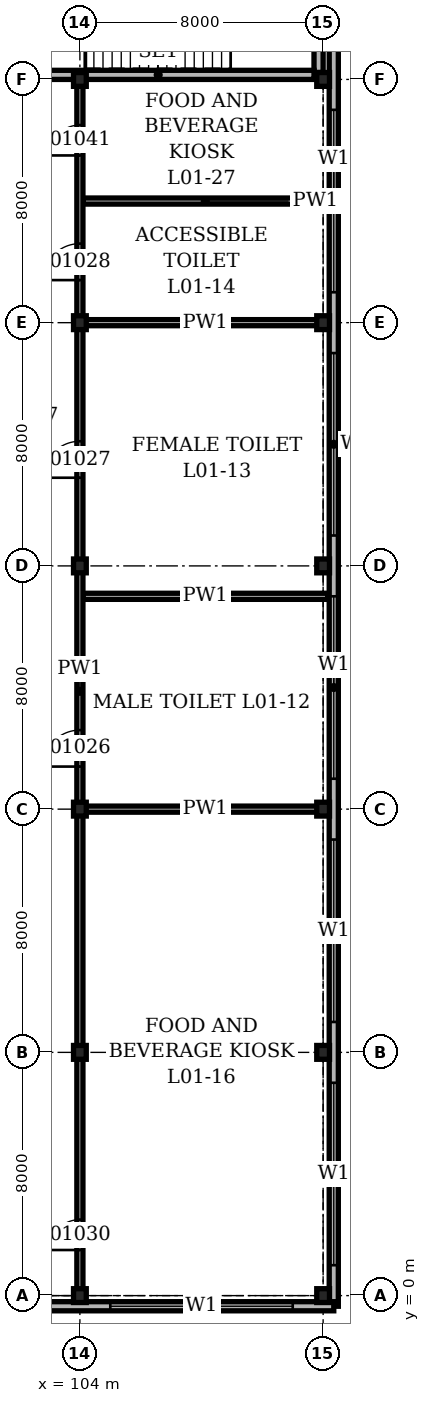
"""IFC4 building model, lengths in metres.
Left out: names, types, materials, properties, quantities, classifications, styles, units other than length and angle.
Written with IfcOpenShell. Run it as: python <this file> out.ifc"""

import sys

from ifc_helpers import new_model, si_unit, direction, frame, frame_2d, origin, origin_2d, place, context, subcontext, project, spatial, rectangle, i_section, extrude, element, fill, save


model = new_model("IFC4")
c1 = context("Model", 3, precision=1e-05, world=origin(), true_north=direction((0.0, 1.0)))
c2 = subcontext(c1, "Body", "Model", "MODEL_VIEW")
j1 = project(units=[si_unit("LENGTHUNIT", "METRE"), si_unit("PLANEANGLEUNIT", "RADIAN")], contexts=[c1])
p1 = place(None, origin())
s1 = spatial("IfcSite", under=j1, at=p1, CompositionType="ELEMENT")
p2 = place(p1, origin())
s2 = spatial("IfcBuilding", under=s1, at=p2, CompositionType="ELEMENT")
p3 = place(p2, frame((0.0, 0.0, 4.9)))
s3 = spatial("IfcBuildingStorey", under=s2, at=p3, CompositionType="ELEMENT", Elevation=4.9)
for number, where, z_axis, x_axis in (
    (1, (104.0, 0.0, 0.0), (0.0, 0.0, 1.0), (1.0, 0.0, 0.0)),
    (2, (104.0, 8.0, 0.0), (0.0, 0.0, 1.0), (1.0, 0.0, 0.0)),
    (3, (104.0, 16.0, 0.0), (0.0, 0.0, 1.0), (1.0, 0.0, 0.0)),
    (4, (104.0, 24.0, 0.0), (0.0, 0.0, 1.0), (1.0, 0.0, 0.0)),
    (5, (104.0, 32.0, 0.0), (0.0, 0.0, 1.0), (1.0, 0.0, 0.0)),
    (6, (104.0, 40.0, 0.0), (0.0, 0.0, 1.0), (1.0, 0.0, 0.0)),
    (7, (112.0, 0.0, 0.0), (0.0, 0.0, 1.0), (1.0, 0.0, 0.0)),
    (8, (112.0, 8.0, 0.0), (0.0, 0.0, 1.0), (1.0, 0.0, 0.0)),
    (9, (112.0, 16.0, 0.0), (0.0, 0.0, 1.0), (1.0, 0.0, 0.0)),
    (10, (112.0, 24.0, 0.0), (0.0, 0.0, 1.0), (1.0, 0.0, 0.0)),
    (11, (112.0, 32.0, 0.0), (0.0, 0.0, 1.0), (1.0, 0.0, 0.0)),
    (12, (112.0, 40.0, 0.0), (0.0, 0.0, 1.0), (1.0, 0.0, 0.0)),
):
    element("IfcColumn", number, at=place(p3, frame(where, z_axis=z_axis, x_axis=x_axis)), inside=s3, PredefinedType="COLUMN", context=c2, shape_type="SweptSolid", body=[
        extrude(i_section(OverallWidth=0.419, OverallDepth=0.455, WebThickness=0.042, FlangeThickness=0.068, at=origin_2d()), origin(), (0.0, 0.0, 1.0), 5.0),
    ])
p4 = place(p3, frame((-0.35, -0.35, 0.0), z_axis=(0.0, 0.0, 1.0), x_axis=(1.0, 0.0, 0.0)))
e13 = element("IfcWall", 13, at=p4, inside=s3, PredefinedType="SOLIDWALL", context=c2, shape_type="SweptSolid", body=[
    extrude(rectangle(XDim=112.7, YDim=0.3, at=frame_2d((56.35, 0.0))), origin(), (0.0, 0.0, 1.0), 5.0),
])
p5 = place(p4, frame((1.35, 0.0, 1.0)))
e14 = element("IfcOpeningElement", 14, at=p5, cuts=e13, PredefinedType="OPENING", context=c2, shape_type="SweptSolid", body=[
    extrude(rectangle(XDim=6.0, YDim=1.5, at=frame_2d((3.0, 0.75))), frame((0.0, 0.16, 0.0), z_axis=(0.0, -1.0, 0.0), x_axis=(1.0, 0.0, 0.0)), (0.0, 0.0, 1.0), 0.32),
])
p6 = place(p4, frame((9.35, 0.0, 1.0)))
e15 = element("IfcOpeningElement", 15, at=p6, cuts=e13, PredefinedType="OPENING", context=c2, shape_type="SweptSolid", body=[
    extrude(rectangle(XDim=6.0, YDim=1.5, at=frame_2d((3.0, 0.75))), frame((0.0, 0.16, 0.0), z_axis=(0.0, -1.0, 0.0), x_axis=(1.0, 0.0, 0.0)), (0.0, 0.0, 1.0), 0.32),
])
p7 = place(p4, frame((17.35, 0.0, 1.0)))
e16 = element("IfcOpeningElement", 16, at=p7, cuts=e13, PredefinedType="OPENING", context=c2, shape_type="SweptSolid", body=[
    extrude(rectangle(XDim=6.0, YDim=1.5, at=frame_2d((3.0, 0.75))), frame((0.0, 0.16, 0.0), z_axis=(0.0, -1.0, 0.0), x_axis=(1.0, 0.0, 0.0)), (0.0, 0.0, 1.0), 0.32),
])
p8 = place(p4, frame((25.35, 0.0, 1.0)))
e17 = element("IfcOpeningElement", 17, at=p8, cuts=e13, PredefinedType="OPENING", context=c2, shape_type="SweptSolid", body=[
    extrude(rectangle(XDim=6.0, YDim=1.5, at=frame_2d((3.0, 0.75))), frame((0.0, 0.16, 0.0), z_axis=(0.0, -1.0, 0.0), x_axis=(1.0, 0.0, 0.0)), (0.0, 0.0, 1.0), 0.32),
])
p9 = place(p4, frame((33.35, 0.0, 1.0)))
e18 = element("IfcOpeningElement", 18, at=p9, cuts=e13, PredefinedType="OPENING", context=c2, shape_type="SweptSolid", body=[
    extrude(rectangle(XDim=6.0, YDim=1.5, at=frame_2d((3.0, 0.75))), frame((0.0, 0.16, 0.0), z_axis=(0.0, -1.0, 0.0), x_axis=(1.0, 0.0, 0.0)), (0.0, 0.0, 1.0), 0.32),
])
p10 = place(p4, frame((41.35, 0.0, 1.0)))
e19 = element("IfcOpeningElement", 19, at=p10, cuts=e13, PredefinedType="OPENING", context=c2, shape_type="SweptSolid", body=[
    extrude(rectangle(XDim=6.0, YDim=1.5, at=frame_2d((3.0, 0.75))), frame((0.0, 0.16, 0.0), z_axis=(0.0, -1.0, 0.0), x_axis=(1.0, 0.0, 0.0)), (0.0, 0.0, 1.0), 0.32),
])
p11 = place(p4, frame((49.35, 0.0, 1.0)))
e20 = element("IfcOpeningElement", 20, at=p11, cuts=e13, PredefinedType="OPENING", context=c2, shape_type="SweptSolid", body=[
    extrude(rectangle(XDim=6.0, YDim=1.5, at=frame_2d((3.0, 0.75))), frame((0.0, 0.16, 0.0), z_axis=(0.0, -1.0, 0.0), x_axis=(1.0, 0.0, 0.0)), (0.0, 0.0, 1.0), 0.32),
])
p12 = place(p4, frame((57.35, 0.0, 1.0)))
e21 = element("IfcOpeningElement", 21, at=p12, cuts=e13, PredefinedType="OPENING", context=c2, shape_type="SweptSolid", body=[
    extrude(rectangle(XDim=6.0, YDim=1.5, at=frame_2d((3.0, 0.75))), frame((0.0, 0.16, 0.0), z_axis=(0.0, -1.0, 0.0), x_axis=(1.0, 0.0, 0.0)), (0.0, 0.0, 1.0), 0.32),
])
p13 = place(p4, frame((65.35, 0.0, 1.0)))
e22 = element("IfcOpeningElement", 22, at=p13, cuts=e13, PredefinedType="OPENING", context=c2, shape_type="SweptSolid", body=[
    extrude(rectangle(XDim=6.0, YDim=1.5, at=frame_2d((3.0, 0.75))), frame((0.0, 0.16, 0.0), z_axis=(0.0, -1.0, 0.0), x_axis=(1.0, 0.0, 0.0)), (0.0, 0.0, 1.0), 0.32),
])
p14 = place(p4, frame((73.35, 0.0, 1.0)))
e23 = element("IfcOpeningElement", 23, at=p14, cuts=e13, PredefinedType="OPENING", context=c2, shape_type="SweptSolid", body=[
    extrude(rectangle(XDim=6.0, YDim=1.5, at=frame_2d((3.0, 0.75))), frame((0.0, 0.16, 0.0), z_axis=(0.0, -1.0, 0.0), x_axis=(1.0, 0.0, 0.0)), (0.0, 0.0, 1.0), 0.32),
])
p15 = place(p4, frame((81.35, 0.0, 1.0)))
e24 = element("IfcOpeningElement", 24, at=p15, cuts=e13, PredefinedType="OPENING", context=c2, shape_type="SweptSolid", body=[
    extrude(rectangle(XDim=6.0, YDim=1.5, at=frame_2d((3.0, 0.75))), frame((0.0, 0.16, 0.0), z_axis=(0.0, -1.0, 0.0), x_axis=(1.0, 0.0, 0.0)), (0.0, 0.0, 1.0), 0.32),
])
p16 = place(p4, frame((89.35, 0.0, 1.0)))
e25 = element("IfcOpeningElement", 25, at=p16, cuts=e13, PredefinedType="OPENING", context=c2, shape_type="SweptSolid", body=[
    extrude(rectangle(XDim=6.0, YDim=1.5, at=frame_2d((3.0, 0.75))), frame((0.0, 0.16, 0.0), z_axis=(0.0, -1.0, 0.0), x_axis=(1.0, 0.0, 0.0)), (0.0, 0.0, 1.0), 0.32),
])
p17 = place(p4, frame((97.35, 0.0, 1.0)))
e26 = element("IfcOpeningElement", 26, at=p17, cuts=e13, PredefinedType="OPENING", context=c2, shape_type="SweptSolid", body=[
    extrude(rectangle(XDim=6.0, YDim=1.5, at=frame_2d((3.0, 0.75))), frame((0.0, 0.16, 0.0), z_axis=(0.0, -1.0, 0.0), x_axis=(1.0, 0.0, 0.0)), (0.0, 0.0, 1.0), 0.32),
])
p18 = place(p4, frame((105.35, 0.0, 1.0)))
e27 = element("IfcOpeningElement", 27, at=p18, cuts=e13, PredefinedType="OPENING", context=c2, shape_type="SweptSolid", body=[
    extrude(rectangle(XDim=6.0, YDim=1.5, at=frame_2d((3.0, 0.75))), frame((0.0, 0.16, 0.0), z_axis=(0.0, -1.0, 0.0), x_axis=(1.0, 0.0, 0.0)), (0.0, 0.0, 1.0), 0.32),
])
p19 = place(p3, frame((112.35, -0.35, 0.0), z_axis=(0.0, 0.0, 1.0), x_axis=(0.0, 1.0, 0.0)))
e28 = element("IfcWall", 28, at=p19, inside=s3, PredefinedType="SOLIDWALL", context=c2, shape_type="SweptSolid", body=[
    extrude(rectangle(XDim=112.7, YDim=0.3, at=frame_2d((56.35, 0.0))), origin(), (0.0, 0.0, 1.0), 5.0),
])
p20 = place(p19, frame((1.35, 0.0, 1.0)))
e29 = element("IfcOpeningElement", 29, at=p20, cuts=e28, PredefinedType="OPENING", context=c2, shape_type="SweptSolid", body=[
    extrude(rectangle(XDim=6.0, YDim=1.5, at=frame_2d((3.0, 0.75))), frame((0.0, 0.16, 0.0), z_axis=(0.0, -1.0, 0.0), x_axis=(1.0, 0.0, 0.0)), (0.0, 0.0, 1.0), 0.32),
])
p21 = place(p19, frame((9.35, 0.0, 1.0)))
e30 = element("IfcOpeningElement", 30, at=p21, cuts=e28, PredefinedType="OPENING", context=c2, shape_type="SweptSolid", body=[
    extrude(rectangle(XDim=6.0, YDim=1.5, at=frame_2d((3.0, 0.75))), frame((0.0, 0.16, 0.0), z_axis=(0.0, -1.0, 0.0), x_axis=(1.0, 0.0, 0.0)), (0.0, 0.0, 1.0), 0.32),
])
p22 = place(p19, frame((17.35, 0.0, 1.0)))
e31 = element("IfcOpeningElement", 31, at=p22, cuts=e28, PredefinedType="OPENING", context=c2, shape_type="SweptSolid", body=[
    extrude(rectangle(XDim=6.0, YDim=1.5, at=frame_2d((3.0, 0.75))), frame((0.0, 0.16, 0.0), z_axis=(0.0, -1.0, 0.0), x_axis=(1.0, 0.0, 0.0)), (0.0, 0.0, 1.0), 0.32),
])
p23 = place(p19, frame((25.35, 0.0, 1.0)))
e32 = element("IfcOpeningElement", 32, at=p23, cuts=e28, PredefinedType="OPENING", context=c2, shape_type="SweptSolid", body=[
    extrude(rectangle(XDim=6.0, YDim=1.5, at=frame_2d((3.0, 0.75))), frame((0.0, 0.16, 0.0), z_axis=(0.0, -1.0, 0.0), x_axis=(1.0, 0.0, 0.0)), (0.0, 0.0, 1.0), 0.32),
])
p24 = place(p19, frame((33.35, 0.0, 1.0)))
e33 = element("IfcOpeningElement", 33, at=p24, cuts=e28, PredefinedType="OPENING", context=c2, shape_type="SweptSolid", body=[
    extrude(rectangle(XDim=6.0, YDim=1.5, at=frame_2d((3.0, 0.75))), frame((0.0, 0.16, 0.0), z_axis=(0.0, -1.0, 0.0), x_axis=(1.0, 0.0, 0.0)), (0.0, 0.0, 1.0), 0.32),
])
p25 = place(p19, frame((41.35, 0.0, 1.0)))
e34 = element("IfcOpeningElement", 34, at=p25, cuts=e28, PredefinedType="OPENING", context=c2, shape_type="SweptSolid", body=[
    extrude(rectangle(XDim=6.0, YDim=1.5, at=frame_2d((3.0, 0.75))), frame((0.0, 0.16, 0.0), z_axis=(0.0, -1.0, 0.0), x_axis=(1.0, 0.0, 0.0)), (0.0, 0.0, 1.0), 0.32),
])
p26 = place(p19, frame((49.35, 0.0, 1.0)))
e35 = element("IfcOpeningElement", 35, at=p26, cuts=e28, PredefinedType="OPENING", context=c2, shape_type="SweptSolid", body=[
    extrude(rectangle(XDim=6.0, YDim=1.5, at=frame_2d((3.0, 0.75))), frame((0.0, 0.16, 0.0), z_axis=(0.0, -1.0, 0.0), x_axis=(1.0, 0.0, 0.0)), (0.0, 0.0, 1.0), 0.32),
])
p27 = place(p19, frame((57.35, 0.0, 1.0)))
e36 = element("IfcOpeningElement", 36, at=p27, cuts=e28, PredefinedType="OPENING", context=c2, shape_type="SweptSolid", body=[
    extrude(rectangle(XDim=6.0, YDim=1.5, at=frame_2d((3.0, 0.75))), frame((0.0, 0.16, 0.0), z_axis=(0.0, -1.0, 0.0), x_axis=(1.0, 0.0, 0.0)), (0.0, 0.0, 1.0), 0.32),
])
p28 = place(p19, frame((65.35, 0.0, 1.0)))
e37 = element("IfcOpeningElement", 37, at=p28, cuts=e28, PredefinedType="OPENING", context=c2, shape_type="SweptSolid", body=[
    extrude(rectangle(XDim=6.0, YDim=1.5, at=frame_2d((3.0, 0.75))), frame((0.0, 0.16, 0.0), z_axis=(0.0, -1.0, 0.0), x_axis=(1.0, 0.0, 0.0)), (0.0, 0.0, 1.0), 0.32),
])
p29 = place(p19, frame((73.35, 0.0, 1.0)))
e38 = element("IfcOpeningElement", 38, at=p29, cuts=e28, PredefinedType="OPENING", context=c2, shape_type="SweptSolid", body=[
    extrude(rectangle(XDim=6.0, YDim=1.5, at=frame_2d((3.0, 0.75))), frame((0.0, 0.16, 0.0), z_axis=(0.0, -1.0, 0.0), x_axis=(1.0, 0.0, 0.0)), (0.0, 0.0, 1.0), 0.32),
])
p30 = place(p19, frame((81.35, 0.0, 1.0)))
e39 = element("IfcOpeningElement", 39, at=p30, cuts=e28, PredefinedType="OPENING", context=c2, shape_type="SweptSolid", body=[
    extrude(rectangle(XDim=6.0, YDim=1.5, at=frame_2d((3.0, 0.75))), frame((0.0, 0.16, 0.0), z_axis=(0.0, -1.0, 0.0), x_axis=(1.0, 0.0, 0.0)), (0.0, 0.0, 1.0), 0.32),
])
p31 = place(p19, frame((89.35, 0.0, 1.0)))
e40 = element("IfcOpeningElement", 40, at=p31, cuts=e28, PredefinedType="OPENING", context=c2, shape_type="SweptSolid", body=[
    extrude(rectangle(XDim=6.0, YDim=1.5, at=frame_2d((3.0, 0.75))), frame((0.0, 0.16, 0.0), z_axis=(0.0, -1.0, 0.0), x_axis=(1.0, 0.0, 0.0)), (0.0, 0.0, 1.0), 0.32),
])
p32 = place(p19, frame((97.35, 0.0, 1.0)))
e41 = element("IfcOpeningElement", 41, at=p32, cuts=e28, PredefinedType="OPENING", context=c2, shape_type="SweptSolid", body=[
    extrude(rectangle(XDim=6.0, YDim=1.5, at=frame_2d((3.0, 0.75))), frame((0.0, 0.16, 0.0), z_axis=(0.0, -1.0, 0.0), x_axis=(1.0, 0.0, 0.0)), (0.0, 0.0, 1.0), 0.32),
])
p33 = place(p19, frame((105.35, 0.0, 1.0)))
e42 = element("IfcOpeningElement", 42, at=p33, cuts=e28, PredefinedType="OPENING", context=c2, shape_type="SweptSolid", body=[
    extrude(rectangle(XDim=6.0, YDim=1.5, at=frame_2d((3.0, 0.75))), frame((0.0, 0.16, 0.0), z_axis=(0.0, -1.0, 0.0), x_axis=(1.0, 0.0, 0.0)), (0.0, 0.0, 1.0), 0.32),
])
p34 = place(p3, frame((111.85, 40.227, 0.0), z_axis=(0.0, 0.0, 1.0), x_axis=(0.0, 1.0, 0.0)))
e43 = element("IfcWall", 43, at=p34, inside=s3, PredefinedType="SOLIDWALL", context=c2, shape_type="SweptSolid", body=[
    extrude(rectangle(XDim=7.545, YDim=0.3, at=frame_2d((3.773, 0.0))), origin(), (0.0, 0.0, 1.0), 4.8),
])
p35 = place(p3, frame((101.45, 40.15, 0.0), z_axis=(0.0, 0.0, 1.0), x_axis=(1.0, 0.0, 0.0)))
e44 = element("IfcWall", 44, at=p35, inside=s3, PredefinedType="SOLIDWALL", context=c2, shape_type="SweptSolid", body=[
    extrude(rectangle(XDim=10.25, YDim=0.3, at=frame_2d((5.125, 0.0))), origin(), (0.0, 0.0, 1.0), 4.8),
])
p36 = place(p3, frame((104.1, 16.0, 0.0), z_axis=(0.0, 0.0, 1.0), x_axis=(1.0, 0.0, 0.0)))
e45 = element("IfcWall", 45, at=p36, inside=s3, PredefinedType="PARTITIONING", context=c2, shape_type="SweptSolid", body=[
    extrude(rectangle(XDim=8.05, YDim=0.2, at=frame_2d((4.025, 0.0))), origin(), (0.0, 0.0, 1.0), 4.028),
])
p37 = place(p3, frame((104.1, 23.0, 0.0), z_axis=(0.0, 0.0, 1.0), x_axis=(1.0, 0.0, 0.0)))
e46 = element("IfcWall", 46, at=p37, inside=s3, PredefinedType="PARTITIONING", context=c2, shape_type="SweptSolid", body=[
    extrude(rectangle(XDim=8.05, YDim=0.2, at=frame_2d((4.025, 0.0))), origin(), (0.0, 0.0, 1.0), 4.8),
])
p38 = place(p3, frame((104.1, 32.0, 0.0), z_axis=(0.0, 0.0, 1.0), x_axis=(1.0, 0.0, 0.0)))
e47 = element("IfcWall", 47, at=p38, inside=s3, PredefinedType="PARTITIONING", context=c2, shape_type="SweptSolid", body=[
    extrude(rectangle(XDim=8.05, YDim=0.2, at=frame_2d((4.025, 0.0))), origin(), (0.0, 0.0, 1.0), 4.028),
])
p39 = place(p3, frame((104.1, 36.0, 0.0), z_axis=(0.0, 0.0, 1.0), x_axis=(1.0, 0.0, 0.0)))
e48 = element("IfcWall", 48, at=p39, inside=s3, PredefinedType="PARTITIONING", context=c2, shape_type="SweptSolid", body=[
    extrude(rectangle(XDim=8.05, YDim=0.2, at=frame_2d((4.025, 0.0))), origin(), (0.0, 0.0, 1.0), 4.8),
])
p40 = place(p3, frame((104.0, -0.15, 0.0), z_axis=(0.0, 0.0, 1.0), x_axis=(0.0, 1.0, 0.0)))
e49 = element("IfcWall", 49, at=p40, inside=s3, PredefinedType="PARTITIONING", context=c2, shape_type="SweptSolid", body=[
    extrude(rectangle(XDim=40.05, YDim=0.2, at=frame_2d((20.025, 0.0))), origin(), (0.0, 0.0, 1.0), 4.028),
])
p41 = place(p40, frame((17.55, 0.0, 0.0)))
e50 = element("IfcOpeningElement", 50, at=p41, cuts=e49, PredefinedType="OPENING", context=c2, shape_type="SweptSolid", body=[
    extrude(rectangle(XDim=1.2, YDim=2.1, at=frame_2d((0.6, 1.05))), frame((0.0, 0.11, 0.0), z_axis=(0.0, -1.0, 0.0), x_axis=(1.0, 0.0, 0.0)), (0.0, 0.0, 1.0), 0.22),
])
p42 = place(p40, frame((27.05, 0.0, 0.0)))
e51 = element("IfcOpeningElement", 51, at=p42, cuts=e49, PredefinedType="OPENING", context=c2, shape_type="SweptSolid", body=[
    extrude(rectangle(XDim=1.2, YDim=2.1, at=frame_2d((0.6, 1.05))), frame((0.0, 0.11, 0.0), z_axis=(0.0, -1.0, 0.0), x_axis=(1.0, 0.0, 0.0)), (0.0, 0.0, 1.0), 0.22),
])
p43 = place(p40, frame((33.55, 0.0, 0.0)))
e52 = element("IfcOpeningElement", 52, at=p43, cuts=e49, PredefinedType="OPENING", context=c2, shape_type="SweptSolid", body=[
    extrude(rectangle(XDim=1.2, YDim=2.1, at=frame_2d((0.6, 1.05))), frame((0.0, 0.11, 0.0), z_axis=(0.0, -1.0, 0.0), x_axis=(1.0, 0.0, 0.0)), (0.0, 0.0, 1.0), 0.22),
])
p44 = place(p40, frame((1.65, 0.0, 0.0)))
e53 = element("IfcOpeningElement", 53, at=p44, cuts=e49, PredefinedType="OPENING", context=c2, shape_type="SweptSolid", body=[
    extrude(rectangle(XDim=1.0, YDim=2.1, at=frame_2d((0.5, 1.05))), frame((0.0, 0.11, 0.0), z_axis=(0.0, -1.0, 0.0), x_axis=(1.0, 0.0, 0.0)), (0.0, 0.0, 1.0), 0.22),
])
p45 = place(p40, frame((37.65, 0.0, 0.0)))
e54 = element("IfcOpeningElement", 54, at=p45, cuts=e49, PredefinedType="OPENING", context=c2, shape_type="SweptSolid", body=[
    extrude(rectangle(XDim=1.0, YDim=2.1, at=frame_2d((0.5, 1.05))), frame((0.0, 0.11, 0.0), z_axis=(0.0, -1.0, 0.0), x_axis=(1.0, 0.0, 0.0)), (0.0, 0.0, 1.0), 0.22),
])
p46 = place(p18, origin())
e55 = element("IfcWindow", 55, at=p46, inside=s3, PartitioningType="SINGLE_PANEL", PredefinedType="WINDOW", context=c2, shape_type="SweptSolid", body=[
    extrude(rectangle(XDim=6.0, YDim=1.5, at=frame_2d((3.0, 0.75))), frame((0.0, 0.03, 0.0), z_axis=(0.0, -1.0, 0.0), x_axis=(1.0, 0.0, 0.0)), (0.0, 0.0, 1.0), 0.06),
])
fill(e27, e55)
p47 = place(p20, origin())
e56 = element("IfcWindow", 56, at=p47, inside=s3, PartitioningType="SINGLE_PANEL", PredefinedType="WINDOW", context=c2, shape_type="SweptSolid", body=[
    extrude(rectangle(XDim=6.0, YDim=1.5, at=frame_2d((3.0, 0.75))), frame((0.0, 0.03, 0.0), z_axis=(0.0, -1.0, 0.0), x_axis=(1.0, 0.0, 0.0)), (0.0, 0.0, 1.0), 0.06),
])
fill(e29, e56)
p48 = place(p21, origin())
e57 = element("IfcWindow", 57, at=p48, inside=s3, PartitioningType="SINGLE_PANEL", PredefinedType="WINDOW", context=c2, shape_type="SweptSolid", body=[
    extrude(rectangle(XDim=6.0, YDim=1.5, at=frame_2d((3.0, 0.75))), frame((0.0, 0.03, 0.0), z_axis=(0.0, -1.0, 0.0), x_axis=(1.0, 0.0, 0.0)), (0.0, 0.0, 1.0), 0.06),
])
fill(e30, e57)
p49 = place(p22, origin())
e58 = element("IfcWindow", 58, at=p49, inside=s3, PartitioningType="SINGLE_PANEL", PredefinedType="WINDOW", context=c2, shape_type="SweptSolid", body=[
    extrude(rectangle(XDim=6.0, YDim=1.5, at=frame_2d((3.0, 0.75))), frame((0.0, 0.03, 0.0), z_axis=(0.0, -1.0, 0.0), x_axis=(1.0, 0.0, 0.0)), (0.0, 0.0, 1.0), 0.06),
])
fill(e31, e58)
p50 = place(p23, origin())
e59 = element("IfcWindow", 59, at=p50, inside=s3, PartitioningType="SINGLE_PANEL", PredefinedType="WINDOW", context=c2, shape_type="SweptSolid", body=[
    extrude(rectangle(XDim=6.0, YDim=1.5, at=frame_2d((3.0, 0.75))), frame((0.0, 0.03, 0.0), z_axis=(0.0, -1.0, 0.0), x_axis=(1.0, 0.0, 0.0)), (0.0, 0.0, 1.0), 0.06),
])
fill(e32, e59)
p51 = place(p24, origin())
e60 = element("IfcWindow", 60, at=p51, inside=s3, PartitioningType="SINGLE_PANEL", PredefinedType="WINDOW", context=c2, shape_type="SweptSolid", body=[
    extrude(rectangle(XDim=6.0, YDim=1.5, at=frame_2d((3.0, 0.75))), frame((0.0, 0.03, 0.0), z_axis=(0.0, -1.0, 0.0), x_axis=(1.0, 0.0, 0.0)), (0.0, 0.0, 1.0), 0.06),
])
fill(e33, e60)
p52 = place(p41, origin())
e61 = element("IfcDoor", 61, at=p52, inside=s3, OperationType="SINGLE_SWING_RIGHT", PredefinedType="DOOR", context=c2, shape_type="SweptSolid", body=[
    extrude(rectangle(XDim=1.2, YDim=2.1, at=frame_2d((0.6, 1.05))), frame((0.0, 0.1, 0.0), z_axis=(0.0, -1.0, 0.0), x_axis=(1.0, 0.0, 0.0)), (0.0, 0.0, 1.0), 0.199),
])
fill(e50, e61)
p53 = place(p42, origin())
e62 = element("IfcDoor", 62, at=p53, inside=s3, OperationType="SINGLE_SWING_RIGHT", PredefinedType="DOOR", context=c2, shape_type="SweptSolid", body=[
    extrude(rectangle(XDim=1.2, YDim=2.1, at=frame_2d((0.6, 1.05))), frame((0.0, 0.1, 0.0), z_axis=(0.0, -1.0, 0.0), x_axis=(1.0, 0.0, 0.0)), (0.0, 0.0, 1.0), 0.199),
])
fill(e51, e62)
p54 = place(p43, origin())
e63 = element("IfcDoor", 63, at=p54, inside=s3, OperationType="SINGLE_SWING_RIGHT", PredefinedType="DOOR", context=c2, shape_type="SweptSolid", body=[
    extrude(rectangle(XDim=1.2, YDim=2.1, at=frame_2d((0.6, 1.05))), frame((0.0, 0.1, 0.0), z_axis=(0.0, -1.0, 0.0), x_axis=(1.0, 0.0, 0.0)), (0.0, 0.0, 1.0), 0.199),
])
fill(e52, e63)
p55 = place(p44, origin())
e64 = element("IfcDoor", 64, at=p55, inside=s3, OperationType="SINGLE_SWING_LEFT", PredefinedType="DOOR", context=c2, shape_type="SweptSolid", body=[
    extrude(rectangle(XDim=1.0, YDim=2.1, at=frame_2d((0.5, 1.05))), frame((0.0, 0.1, 0.0), z_axis=(0.0, -1.0, 0.0), x_axis=(1.0, 0.0, 0.0)), (0.0, 0.0, 1.0), 0.199),
])
fill(e53, e64)
p56 = place(p45, origin())
e65 = element("IfcDoor", 65, at=p56, inside=s3, OperationType="SINGLE_SWING_LEFT", PredefinedType="DOOR", context=c2, shape_type="SweptSolid", body=[
    extrude(rectangle(XDim=1.0, YDim=2.1, at=frame_2d((0.5, 1.05))), frame((0.0, 0.1, 0.0), z_axis=(0.0, -1.0, 0.0), x_axis=(1.0, 0.0, 0.0)), (0.0, 0.0, 1.0), 0.199),
])
fill(e54, e65)
save(model, sys.argv[1])
